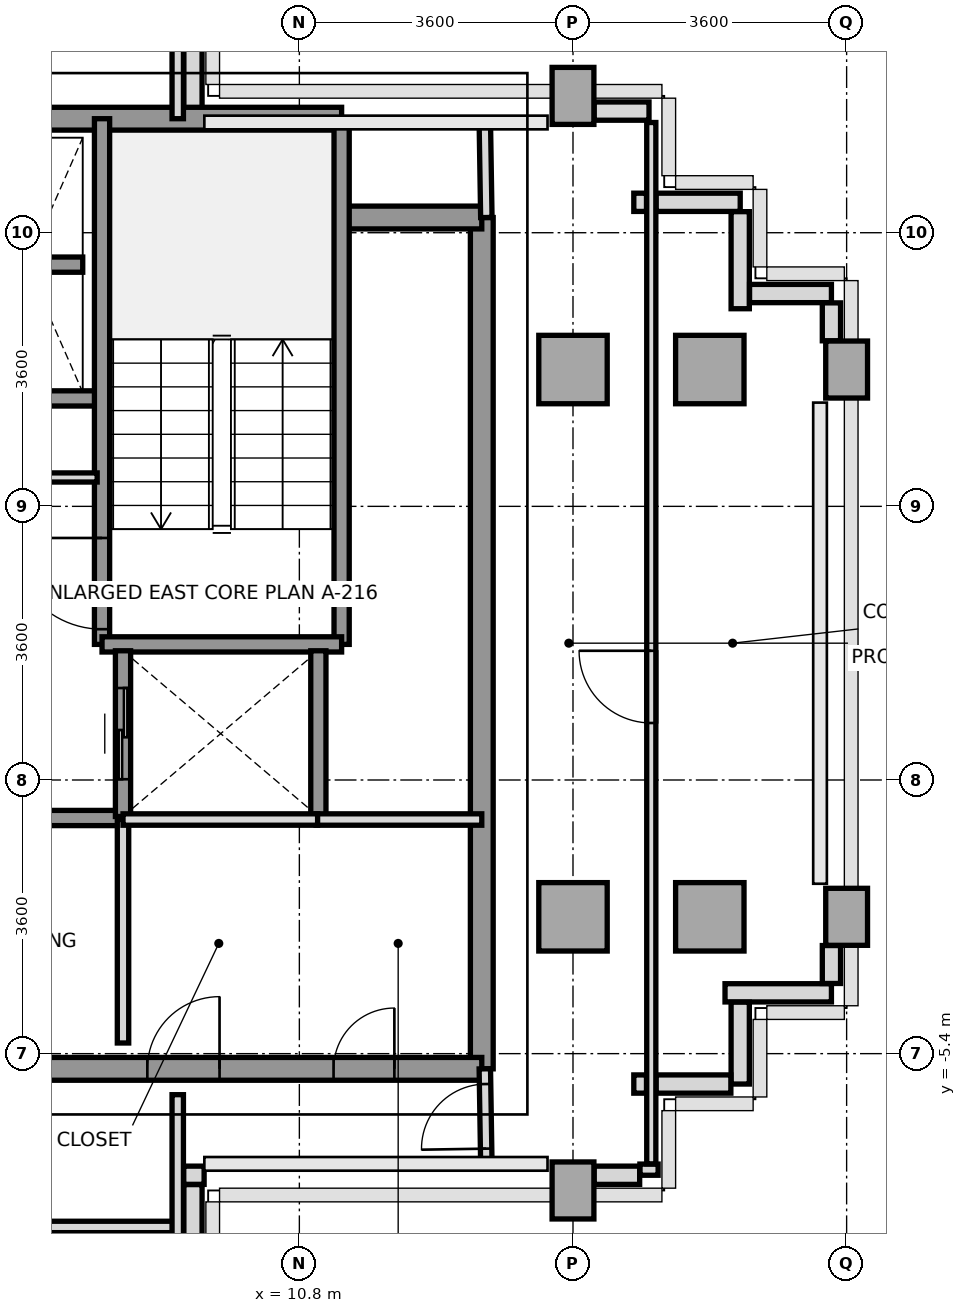
"""IFC4 building model, lengths in metres.
Left out: names, types, materials, properties, quantities, classifications, styles, units other than length and angle.
Written with IfcOpenShell. Run it as: python <this file> out.ifc"""

import sys

from ifc_helpers import new_model, si_unit, direction, frame, frame_2d, origin, origin_2d, place, context, subcontext, project, spatial, rectangle, extrude, source, transform, mapped, element, fill, save


model = new_model("IFC4")
c1 = context("Model", 3, precision=1e-05, world=origin(), true_north=direction((0.0, 1.0)))
c2 = subcontext(c1, "Body", "Model", "MODEL_VIEW")
j1 = project(units=[si_unit("LENGTHUNIT", "METRE"), si_unit("PLANEANGLEUNIT", "RADIAN")], contexts=[c1])
p1 = place(None, origin())
s1 = spatial("IfcSite", under=j1, at=p1, CompositionType="ELEMENT")
p2 = place(p1, origin())
s2 = spatial("IfcBuilding", under=s1, at=p2, CompositionType="ELEMENT")
p3 = place(p2, frame((0.0, 0.0, 236.4)))
s3 = spatial("IfcBuildingStorey", under=s2, at=p3, CompositionType="ELEMENT", Elevation=236.4)
m1 = source(origin(), c2, "Body", "SweptSolid", [
    extrude(rectangle(XDim=0.55, YDim=0.75, at=origin_2d()), origin(), (0.0, 0.0, 1.0), 3.01),
])
p4 = place(p3, frame((14.4, -7.2, 0.0), z_axis=(0.0, 0.0, 1.0), x_axis=(1.0, 0.0, 0.0)))
e1 = element("IfcColumn", 1, at=p4, inside=s3, PredefinedType="COLUMN", context=c2, shape_type="MappedRepresentation", body=[
    mapped(m1, transform((0.0, 0.0, 0.0), x_axis=(1.0, 0.0, 0.0), y_axis=(0.0, 1.0, 0.0), z_axis=(0.0, 0.0, 1.0), scale=1.0)),
])
m2 = source(origin(), c2, "Body", "SweptSolid", [
    extrude(rectangle(XDim=0.9, YDim=0.9, at=origin_2d()), origin(), (0.0, 0.0, 1.0), 3.01),
])
for number, where, z_axis, x_axis in (
    (2, (14.4, -3.6, 0.0), (0.0, 0.0, 1.0), (1.0, 0.0, 0.0)),
    (3, (14.4, 3.6, 0.0), (0.0, 0.0, 1.0), (1.0, 0.0, 0.0)),
):
    element("IfcColumn", number, at=place(p3, frame(where, z_axis=z_axis, x_axis=x_axis)), inside=s3, PredefinedType="COLUMN", context=c2, shape_type="MappedRepresentation", body=[
        mapped(m2, transform((0.0, 0.0, 0.0), x_axis=(1.0, 0.0, 0.0), y_axis=(0.0, 1.0, 0.0), z_axis=(0.0, 0.0, 1.0), scale=1.0)),
    ])
p5 = place(p3, frame((14.4, 7.2, 0.0), z_axis=(0.0, 0.0, 1.0), x_axis=(1.0, 0.0, 0.0)))
e4 = element("IfcColumn", 4, at=p5, inside=s3, PredefinedType="COLUMN", context=c2, shape_type="MappedRepresentation", body=[
    mapped(m1, transform((0.0, 0.0, 0.0), x_axis=(1.0, 0.0, 0.0), y_axis=(0.0, 1.0, 0.0), z_axis=(0.0, 0.0, 1.0), scale=1.0)),
])
for number, where, z_axis, x_axis in (
    (5, (16.2, -3.6, 0.0), (0.0, 0.0, 1.0), (1.0, 0.0, 0.0)),
    (6, (16.2, 3.6, 0.0), (0.0, 0.0, 1.0), (1.0, 0.0, 0.0)),
):
    element("IfcColumn", number, at=place(p3, frame(where, z_axis=z_axis, x_axis=x_axis)), inside=s3, PredefinedType="COLUMN", context=c2, shape_type="MappedRepresentation", body=[
        mapped(m2, transform((0.0, 0.0, 0.0), x_axis=(1.0, 0.0, 0.0), y_axis=(0.0, 1.0, 0.0), z_axis=(0.0, 0.0, 1.0), scale=1.0)),
    ])
for number, where, z_axis, x_axis in (
    (7, (18.0, -3.6, 0.0), (0.0, 0.0, 1.0), (1.0, 0.0, 0.0)),
    (8, (18.0, 3.6, 0.0), (0.0, 0.0, 1.0), (1.0, 0.0, 0.0)),
):
    element("IfcColumn", number, at=place(p3, frame(where, z_axis=z_axis, x_axis=x_axis)), inside=s3, PredefinedType="COLUMN", context=c2, shape_type="MappedRepresentation", body=[
        mapped(m1, transform((0.0, 0.0, 0.0), x_axis=(1.0, 0.0, 0.0), y_axis=(0.0, 1.0, 0.0), z_axis=(0.0, 0.0, 1.0), scale=1.0)),
    ])
p6 = place(p3, frame((17.8, -4.6, 0.0), z_axis=(0.0, 0.0, 1.0), x_axis=(-1.0, 0.0, 0.0)))
e9 = element("IfcWall", 9, at=p6, inside=s3, PredefinedType="PARAPET", context=c2, shape_type="SweptSolid", body=[
    extrude(rectangle(XDim=1.4, YDim=0.24, at=frame_2d((0.7, 0.0))), origin(), (0.0, 0.0, 1.0), 1.15),
])
p7 = place(p3, frame((16.6, -4.723, 0.0), z_axis=(0.0, 0.0, 1.0), x_axis=(0.0, -1.0, 0.0)))
e10 = element("IfcWall", 10, at=p7, inside=s3, PredefinedType="PARAPET", context=c2, shape_type="SweptSolid", body=[
    extrude(rectangle(XDim=1.077, YDim=0.24, at=frame_2d((0.539, 0.0))), origin(), (0.0, 0.0, 1.0), 1.15),
])
p8 = place(p3, frame((16.477, -5.8, 0.0), z_axis=(0.0, 0.0, 1.0), x_axis=(-1.0, 0.0, 0.0)))
e11 = element("IfcWall", 11, at=p8, inside=s3, PredefinedType="PARAPET", context=c2, shape_type="SweptSolid", body=[
    extrude(rectangle(XDim=0.984, YDim=0.24, at=frame_2d((0.492, 0.0))), origin(), (0.0, 0.0, 1.0), 1.15),
])
p9 = place(p3, frame((15.367, -5.8, 0.0), z_axis=(0.0, 0.0, 1.0), x_axis=(-1.0, 0.0, 0.0)))
e12 = element("IfcWall", 12, at=p9, inside=s3, PredefinedType="PARAPET", context=c2, shape_type="SweptSolid", body=[
    extrude(rectangle(XDim=0.167, YDim=0.24, at=frame_2d((0.083, 0.0))), origin(), (0.0, 0.0, 1.0), 1.15),
])
p10 = place(p3, frame((15.4, -6.853, 0.0), z_axis=(0.0, 0.0, 1.0), x_axis=(0.0, -1.0, 0.0)))
e13 = element("IfcWall", 13, at=p10, inside=s3, PredefinedType="PARAPET", context=c2, shape_type="SweptSolid", body=[
    extrude(rectangle(XDim=0.147, YDim=0.24, at=frame_2d((0.073, 0.0))), origin(), (0.0, 0.0, 1.0), 1.15),
])
p11 = place(p3, frame((15.277, -7.0, 0.0), z_axis=(0.0, 0.0, 1.0), x_axis=(-1.0, 0.0, 0.0)))
e14 = element("IfcWall", 14, at=p11, inside=s3, PredefinedType="PARAPET", context=c2, shape_type="SweptSolid", body=[
    extrude(rectangle(XDim=0.599, YDim=0.24, at=frame_2d((0.3, 0.0))), origin(), (0.0, 0.0, 1.0), 1.15),
])
p12 = place(p3, frame((9.547, -7.0, 0.0), z_axis=(0.0, 0.0, 1.0), x_axis=(-1.0, 0.0, 0.0)))
e15 = element("IfcWall", 15, at=p12, inside=s3, PredefinedType="PARAPET", context=c2, shape_type="SweptSolid", body=[
    extrude(rectangle(XDim=0.269, YDim=0.24, at=frame_2d((0.135, 0.0))), origin(), (0.0, 0.0, 1.0), 1.15),
])
p13 = place(p3, frame((9.4, -7.123, 0.0), z_axis=(0.0, 0.0, 1.0), x_axis=(0.0, -1.0, 0.0)))
e16 = element("IfcWall", 16, at=p13, inside=s3, PredefinedType="PARAPET", context=c2, shape_type="SweptSolid", body=[
    extrude(rectangle(XDim=1.499, YDim=0.24, at=frame_2d((0.75, 0.0))), origin(), (0.0, 0.0, 1.0), 1.15),
])
p14 = place(p3, frame((9.4, 8.622, 0.0), z_axis=(0.0, 0.0, 1.0), x_axis=(0.0, -1.0, 0.0)))
e17 = element("IfcWall", 17, at=p14, inside=s3, PredefinedType="PARAPET", context=c2, shape_type="SweptSolid", body=[
    extrude(rectangle(XDim=1.669, YDim=0.24, at=frame_2d((0.834, 0.0))), origin(), (0.0, 0.0, 1.0), 1.15),
])
p15 = place(p3, frame((14.678, 7.0, 0.0), z_axis=(0.0, 0.0, 1.0), x_axis=(1.0, 0.0, 0.0)))
e18 = element("IfcWall", 18, at=p15, inside=s3, PredefinedType="PARAPET", context=c2, shape_type="SweptSolid", body=[
    extrude(rectangle(XDim=0.722, YDim=0.24, at=frame_2d((0.361, 0.0))), origin(), (0.0, 0.0, 1.0), 1.15),
])
p16 = place(p3, frame((15.2, 5.8, 0.0), z_axis=(0.0, 0.0, 1.0), x_axis=(1.0, 0.0, 0.0)))
e19 = element("IfcWall", 19, at=p16, inside=s3, PredefinedType="PARAPET", context=c2, shape_type="SweptSolid", body=[
    extrude(rectangle(XDim=0.167, YDim=0.24, at=frame_2d((0.083, 0.0))), origin(), (0.0, 0.0, 1.0), 1.15),
])
p17 = place(p3, frame((15.493, 5.8, 0.0), z_axis=(0.0, 0.0, 1.0), x_axis=(1.0, 0.0, 0.0)))
e20 = element("IfcWall", 20, at=p17, inside=s3, PredefinedType="PARAPET", context=c2, shape_type="SweptSolid", body=[
    extrude(rectangle(XDim=1.107, YDim=0.24, at=frame_2d((0.554, 0.0))), origin(), (0.0, 0.0, 1.0), 1.15),
])
p18 = place(p3, frame((16.6, 5.677, 0.0), z_axis=(0.0, 0.0, 1.0), x_axis=(0.0, -1.0, 0.0)))
e21 = element("IfcWall", 21, at=p18, inside=s3, PredefinedType="PARAPET", context=c2, shape_type="SweptSolid", body=[
    extrude(rectangle(XDim=1.277, YDim=0.24, at=frame_2d((0.639, 0.0))), origin(), (0.0, 0.0, 1.0), 1.15),
])
p19 = place(p3, frame((16.723, 4.6, 0.0), z_axis=(0.0, 0.0, 1.0), x_axis=(1.0, 0.0, 0.0)))
e22 = element("IfcWall", 22, at=p19, inside=s3, PredefinedType="PARAPET", context=c2, shape_type="SweptSolid", body=[
    extrude(rectangle(XDim=1.077, YDim=0.24, at=frame_2d((0.539, 0.0))), origin(), (0.0, 0.0, 1.0), 1.15),
])
for number, where, z_axis, x_axis in (
    (23, (17.8, 4.477, 0.0), (0.0, 0.0, 1.0), (0.0, -1.0, 0.0)),
    (24, (17.8, -3.978, 0.0), (0.0, 0.0, 1.0), (0.0, -1.0, 0.0)),
):
    element("IfcWall", number, at=place(p3, frame(where, z_axis=z_axis, x_axis=x_axis)), inside=s3, PredefinedType="PARAPET", context=c2, shape_type="SweptSolid", body=[
        extrude(rectangle(XDim=0.499, YDim=0.24, at=frame_2d((0.25, 0.0))), origin(), (0.0, 0.0, 1.0), 1.15),
    ])
p20 = place(p3, frame((13.2, -5.6, 0.0), z_axis=(0.0, 0.0, 1.0), x_axis=(0.0, 1.0, 0.0)))
e25 = element("IfcWall", 25, at=p20, inside=s3, PredefinedType="SHEAR", context=c2, shape_type="SweptSolid", body=[
    extrude(rectangle(XDim=11.2, YDim=0.3, at=frame_2d((5.6, 0.0))), origin(), (0.0, 0.0, 1.0), 3.01),
])
p21 = place(p3, frame((5.4, 6.9, 0.0), z_axis=(0.0, 0.0, 1.0), x_axis=(1.0, 0.0, 0.0)))
e26 = element("IfcWall", 26, at=p21, inside=s3, PredefinedType="SHEAR", context=c2, shape_type="SweptSolid", body=[
    extrude(rectangle(XDim=5.956, YDim=0.3, at=frame_2d((2.978, 0.0))), origin(), (0.0, 0.0, 1.0), 3.01),
])
p22 = place(p3, frame((11.356, 5.6, 0.0), z_axis=(0.0, 0.0, 1.0), x_axis=(1.0, 0.0, 0.0)))
e27 = element("IfcWall", 27, at=p22, inside=s3, PredefinedType="SHEAR", context=c2, shape_type="SweptSolid", body=[
    extrude(rectangle(XDim=1.844, YDim=0.3, at=frame_2d((0.922, 0.0))), origin(), (0.0, 0.0, 1.0), 3.01),
])
p23 = place(p3, frame((5.4, -5.6, 0.0), z_axis=(0.0, 0.0, 1.0), x_axis=(1.0, 0.0, 0.0)))
e28 = element("IfcWall", 28, at=p23, inside=s3, PredefinedType="SHEAR", context=c2, shape_type="SweptSolid", body=[
    extrude(rectangle(XDim=7.8, YDim=0.3, at=frame_2d((3.9, 0.0))), origin(), (0.0, 0.0, 1.0), 3.01),
])
p24 = place(p23, frame((5.85, 0.0, 0.0)))
e29 = element("IfcOpeningElement", 29, at=p24, cuts=e28, PredefinedType="OPENING", context=c2, shape_type="SweptSolid", body=[
    extrude(rectangle(XDim=0.8, YDim=2.1, at=frame_2d((0.4, 1.05))), frame((0.0, 0.16, 0.0), z_axis=(0.0, -1.0, 0.0), x_axis=(1.0, 0.0, 0.0)), (0.0, 0.0, 1.0), 0.32),
])
p25 = place(p23, frame((3.4, 0.0, 0.0)))
e30 = element("IfcOpeningElement", 30, at=p25, cuts=e28, PredefinedType="OPENING", context=c2, shape_type="SweptSolid", body=[
    extrude(rectangle(XDim=0.95, YDim=2.15, at=frame_2d((0.475, 1.075))), frame((0.0, 0.16, 0.0), z_axis=(0.0, -1.0, 0.0), x_axis=(1.0, 0.0, 0.0)), (0.0, 0.0, 1.0), 0.32),
])
p26 = place(p3, frame((5.4, 3.22, 0.0), z_axis=(0.0, 0.0, 1.0), x_axis=(1.0, 0.0, 0.0)))
e31 = element("IfcWall", 31, at=p26, inside=s3, PredefinedType="SOLIDWALL", context=c2, shape_type="SweptSolid", body=[
    extrude(rectangle(XDim=2.78, YDim=0.2, at=frame_2d((1.39, 0.0))), origin(), (0.0, 0.0, 1.0), 3.01),
])
p27 = place(p3, frame((5.4, -2.3, 0.0), z_axis=(0.0, 0.0, 1.0), x_axis=(1.0, 0.0, 0.0)))
e32 = element("IfcWall", 32, at=p27, inside=s3, PredefinedType="SOLIDWALL", context=c2, shape_type="SweptSolid", body=[
    extrude(rectangle(XDim=3.08, YDim=0.2, at=frame_2d((1.54, 0.0))), origin(), (0.0, 0.0, 1.0), 3.01),
])
p28 = place(p3, frame((8.204, -0.016, 0.0), z_axis=(0.0, 0.0, 1.0), x_axis=(0.0, 1.0, 0.0)))
e33 = element("IfcWall", 33, at=p28, inside=s3, PredefinedType="SOLIDWALL", context=c2, shape_type="SweptSolid", body=[
    extrude(rectangle(XDim=6.916, YDim=0.2, at=frame_2d((3.458, 0.0))), origin(), (0.0, 0.0, 1.0), 3.01),
])
p29 = place(p28, frame((0.2, 0.0, 0.0)))
e34 = element("IfcOpeningElement", 34, at=p29, cuts=e33, PredefinedType="OPENING", context=c2, shape_type="SweptSolid", body=[
    extrude(rectangle(XDim=1.2, YDim=2.2, at=frame_2d((0.6, 1.1))), frame((0.0, 0.11, 0.0), z_axis=(0.0, -1.0, 0.0), x_axis=(1.0, 0.0, 0.0)), (0.0, 0.0, 1.0), 0.22),
])
p30 = place(p3, frame((11.356, -0.016, 0.0), z_axis=(0.0, 0.0, 1.0), x_axis=(0.0, 1.0, 0.0)))
e35 = element("IfcWall", 35, at=p30, inside=s3, PredefinedType="SOLIDWALL", context=c2, shape_type="SweptSolid", body=[
    extrude(rectangle(XDim=6.916, YDim=0.2, at=frame_2d((3.458, 0.0))), origin(), (0.0, 0.0, 1.0), 3.01),
])
p31 = place(p3, frame((8.204, -0.016, 0.0), z_axis=(0.0, 0.0, 1.0), x_axis=(1.0, 0.0, 0.0)))
e36 = element("IfcWall", 36, at=p31, inside=s3, PredefinedType="SOLIDWALL", context=c2, shape_type="SweptSolid", body=[
    extrude(rectangle(XDim=3.152, YDim=0.2, at=frame_2d((1.576, 0.0))), origin(), (0.0, 0.0, 1.0), 3.01),
])
p32 = place(p3, frame((8.48, -2.28, 0.0), z_axis=(0.0, 0.0, 1.0), x_axis=(0.0, 1.0, 0.0)))
e37 = element("IfcWall", 37, at=p32, inside=s3, PredefinedType="SOLIDWALL", context=c2, shape_type="SweptSolid", body=[
    extrude(rectangle(XDim=2.18, YDim=0.2, at=frame_2d((1.09, 0.0))), origin(), (0.0, 0.0, 1.0), 3.01),
])
p33 = place(p32, frame((0.49, 0.0, 0.0)))
e38 = element("IfcOpeningElement", 38, at=p33, cuts=e37, PredefinedType="OPENING", context=c2, shape_type="SweptSolid", body=[
    extrude(rectangle(XDim=1.2, YDim=2.2, at=frame_2d((0.6, 1.1))), frame((0.0, 0.11, 0.0), z_axis=(0.0, -1.0, 0.0), x_axis=(1.0, 0.0, 0.0)), (0.0, 0.0, 1.0), 0.22),
])
p34 = place(p3, frame((11.05, -2.28, 0.0), z_axis=(0.0, 0.0, 1.0), x_axis=(0.0, 1.0, 0.0)))
e39 = element("IfcWall", 39, at=p34, inside=s3, PredefinedType="SOLIDWALL", context=c2, shape_type="SweptSolid", body=[
    extrude(rectangle(XDim=2.18, YDim=0.2, at=frame_2d((1.09, 0.0))), origin(), (0.0, 0.0, 1.0), 3.01),
])
p35 = place(p3, frame((6.48, 4.98, 0.0), z_axis=(0.0, 0.0, 1.0), x_axis=(1.0, 0.0, 0.0)))
e40 = element("IfcWall", 40, at=p35, inside=s3, PredefinedType="SOLIDWALL", context=c2, shape_type="SweptSolid", body=[
    extrude(rectangle(XDim=1.47, YDim=0.2, at=frame_2d((0.735, 0.0))), origin(), (0.0, 0.0, 1.0), 3.01),
])
p36 = place(p3, frame((5.75, 2.18, 0.0), z_axis=(0.0, 0.0, 1.0), x_axis=(1.0, 0.0, 0.0)))
e41 = element("IfcWall", 41, at=p36, inside=s3, PredefinedType="PARTITIONING", context=c2, shape_type="SweptSolid", body=[
    extrude(rectangle(XDim=2.39, YDim=0.12, at=frame_2d((1.195, 0.0))), origin(), (0.0, 0.0, 1.0), 3.01),
])
p37 = place(p3, frame((11.02, -2.32, 0.0), z_axis=(0.0, 0.0, 1.0), x_axis=(1.0, 0.0, 0.0)))
e42 = element("IfcWall", 42, at=p37, inside=s3, PredefinedType="PARTITIONING", context=c2, shape_type="SweptSolid", body=[
    extrude(rectangle(XDim=2.18, YDim=0.15, at=frame_2d((1.09, 0.0))), origin(), (0.0, 0.0, 1.0), 3.01),
])
p38 = place(p3, frame((8.48, -5.26, 0.0), z_axis=(0.0, 0.0, 1.0), x_axis=(0.0, 1.0, 0.0)))
e43 = element("IfcWall", 43, at=p38, inside=s3, PredefinedType="PARTITIONING", context=c2, shape_type="SweptSolid", body=[
    extrude(rectangle(XDim=2.94, YDim=0.15, at=frame_2d((1.47, 0.0))), origin(), (0.0, 0.0, 1.0), 3.01),
])
p39 = place(p3, frame((8.48, -2.32, 0.0), z_axis=(0.0, 0.0, 1.0), x_axis=(1.0, 0.0, 0.0)))
e44 = element("IfcWall", 44, at=p39, inside=s3, PredefinedType="PARTITIONING", context=c2, shape_type="SweptSolid", body=[
    extrude(rectangle(XDim=2.56, YDim=0.15, at=frame_2d((1.28, 0.0))), origin(), (0.0, 0.0, 1.0), 3.01),
])
p40 = place(p3, frame((9.2, 6.9, 0.0), z_axis=(0.0, 0.0, 1.0), x_axis=(0.0, 1.0, 0.0)))
e45 = element("IfcWall", 45, at=p40, inside=s3, PredefinedType="PARTITIONING", context=c2, shape_type="SweptSolid", body=[
    extrude(rectangle(XDim=3.38, YDim=0.15, at=frame_2d((1.69, 0.0))), origin(), (0.0, 0.0, 1.0), 2.61),
])
p41 = place(p3, frame((-9.2, -7.68, 0.0), z_axis=(0.0, 0.0, 1.0), x_axis=(1.0, 0.0, 0.0)))
e46 = element("IfcWall", 46, at=p41, inside=s3, PredefinedType="PARTITIONING", context=c2, shape_type="SweptSolid", body=[
    extrude(rectangle(XDim=18.4, YDim=0.15, at=frame_2d((9.2, 0.0))), origin(), (0.0, 0.0, 1.0), 2.57),
])
p42 = place(p41, frame((2.0, 0.0, 0.0)))
e47 = element("IfcOpeningElement", 47, at=p42, cuts=e46, PredefinedType="OPENING", context=c2, shape_type="SweptSolid", body=[
    extrude(rectangle(XDim=0.95, YDim=2.15, at=frame_2d((0.475, 1.075))), frame((0.0, 0.085, 0.0), z_axis=(0.0, -1.0, 0.0), x_axis=(1.0, 0.0, 0.0)), (0.0, 0.0, 1.0), 0.17),
])
p43 = place(p41, frame((10.6, 0.0, 0.0)))
e48 = element("IfcOpeningElement", 48, at=p43, cuts=e46, PredefinedType="OPENING", context=c2, shape_type="SweptSolid", body=[
    extrude(rectangle(XDim=1.1, YDim=2.2, at=frame_2d((0.55, 1.1))), frame((0.0, 0.085, 0.0), z_axis=(0.0, -1.0, 0.0), x_axis=(1.0, 0.0, 0.0)), (0.0, 0.0, 1.0), 0.17),
])
p44 = place(p3, frame((9.2, -10.28, 0.0), z_axis=(0.0, 0.0, 1.0), x_axis=(0.0, 1.0, 0.0)))
e49 = element("IfcWall", 49, at=p44, inside=s3, PredefinedType="PARTITIONING", context=c2, shape_type="SweptSolid", body=[
    extrude(rectangle(XDim=4.34, YDim=0.15, at=frame_2d((2.17, 0.0))), origin(), (0.0, 0.0, 1.0), 2.61),
])
p45 = place(p3, frame((13.26, 5.6, 0.0), z_axis=(0.0, 0.0, 1.0), x_axis=(-0.016013571389, 0.999871774545, 0.0)))
e50 = element("IfcWall", 50, at=p45, inside=s3, PredefinedType="PARTITIONING", context=c2, shape_type="SweptSolid", body=[
    extrude(rectangle(XDim=1.25, YDim=0.15, at=frame_2d((0.625, 0.0))), origin(), (0.0, 0.0, 1.0), 3.01),
])
p46 = place(p3, frame((13.26, -6.85, 0.0), z_axis=(0.0, 0.0, 1.0), x_axis=(-0.016013571389, 0.999871774545, 0.0)))
e51 = element("IfcWall", 51, at=p46, inside=s3, PredefinedType="PARTITIONING", context=c2, shape_type="SweptSolid", body=[
    extrude(rectangle(XDim=1.25, YDim=0.15, at=frame_2d((0.625, 0.0))), origin(), (0.0, 0.0, 1.0), 3.01),
])
p47 = place(p46, frame((0.2, 0.0, 0.0)))
e52 = element("IfcOpeningElement", 52, at=p47, cuts=e51, PredefinedType="OPENING", context=c2, shape_type="SweptSolid", body=[
    extrude(rectangle(XDim=0.85, YDim=2.1, at=frame_2d((0.425, 1.05))), frame((0.0, 0.085, 0.0), z_axis=(0.0, -1.0, 0.0), x_axis=(1.0, 0.0, 0.0)), (0.0, 0.0, 1.0), 0.17),
])
p48 = place(p3, frame((15.43, -6.85, 0.0), z_axis=(0.0, 0.0, 1.0), x_axis=(0.0, 1.0, 0.0)))
e53 = element("IfcWall", 53, at=p48, inside=s3, PredefinedType="PARTITIONING", context=c2, shape_type="SweptSolid", body=[
    extrude(rectangle(XDim=13.7, YDim=0.12, at=frame_2d((6.85, 0.0))), origin(), (0.0, 0.0, 1.0), 3.01),
])
p49 = place(p48, frame((5.8, 0.0, 0.0)))
e54 = element("IfcOpeningElement", 54, at=p49, cuts=e53, PredefinedType="OPENING", context=c2, shape_type="SweptSolid", body=[
    extrude(rectangle(XDim=0.95, YDim=2.15, at=frame_2d((0.475, 1.075))), frame((0.0, 0.07, 0.0), z_axis=(0.0, -1.0, 0.0), x_axis=(1.0, 0.0, 0.0)), (0.0, 0.0, 1.0), 0.14),
])
m3 = source(origin(), c2, "Body", "SweptSolid", [
    extrude(rectangle(XDim=1.2, YDim=2.2, at=frame_2d((0.6, 1.1))), frame((0.0, 0.025, 0.0), z_axis=(0.0, -1.0, 0.0), x_axis=(1.0, 0.0, 0.0)), (0.0, 0.0, 1.0), 0.05),
])
p50 = place(p29, origin())
e55 = element("IfcDoor", 55, at=p50, inside=s3, OperationType="SINGLE_SWING_RIGHT", PredefinedType="DOOR", context=c2, shape_type="MappedRepresentation", body=[
    mapped(m3, transform((0.0, 0.0, 0.0), x_axis=(1.0, 0.0, 0.0), y_axis=(0.0, 1.0, 0.0), z_axis=(0.0, 0.0, 1.0), scale=1.0)),
])
fill(e34, e55)
m4 = source(origin(), c2, "Body", "SweptSolid", [
    extrude(rectangle(XDim=0.8, YDim=2.1, at=frame_2d((0.4, 1.05))), frame((0.0, 0.025, 0.0), z_axis=(0.0, -1.0, 0.0), x_axis=(1.0, 0.0, 0.0)), (0.0, 0.0, 1.0), 0.05),
])
p51 = place(p24, origin())
e56 = element("IfcDoor", 56, at=p51, inside=s3, OperationType="SINGLE_SWING_RIGHT", PredefinedType="DOOR", context=c2, shape_type="MappedRepresentation", body=[
    mapped(m4, transform((0.0, 0.0, 0.0), x_axis=(1.0, 0.0, 0.0), y_axis=(0.0, 1.0, 0.0), z_axis=(0.0, 0.0, 1.0), scale=1.0)),
])
fill(e29, e56)
m5 = source(origin(), c2, "Body", "SweptSolid", [
    extrude(rectangle(XDim=0.95, YDim=2.15, at=frame_2d((0.475, 1.075))), frame((0.0, 0.025, 0.0), z_axis=(0.0, -1.0, 0.0), x_axis=(1.0, 0.0, 0.0)), (0.0, 0.0, 1.0), 0.05),
])
p52 = place(p25, origin())
e57 = element("IfcDoor", 57, at=p52, inside=s3, OperationType="SINGLE_SWING_RIGHT", PredefinedType="DOOR", context=c2, shape_type="MappedRepresentation", body=[
    mapped(m5, transform((0.0, 0.0, 0.0), x_axis=(1.0, 0.0, 0.0), y_axis=(0.0, 1.0, 0.0), z_axis=(0.0, 0.0, 1.0), scale=1.0)),
])
fill(e30, e57)
p53 = place(p33, origin())
e58 = element("IfcDoor", 58, at=p53, inside=s3, OperationType="SLIDING_TO_RIGHT", PredefinedType="DOOR", context=c2, shape_type="MappedRepresentation", body=[
    mapped(m3, transform((0.0, 0.0, 0.0), x_axis=(1.0, 0.0, 0.0), y_axis=(0.0, 1.0, 0.0), z_axis=(0.0, 0.0, 1.0), scale=1.0)),
])
fill(e38, e58)
m6 = source(origin(), c2, "Body", "SweptSolid", [
    extrude(rectangle(XDim=0.85, YDim=2.1, at=frame_2d((0.425, 1.05))), frame((0.0, 0.025, 0.0), z_axis=(0.0, -1.0, 0.0), x_axis=(1.0, 0.0, 0.0)), (0.0, 0.0, 1.0), 0.05),
])
p54 = place(p47, origin())
e59 = element("IfcDoor", 59, at=p54, inside=s3, OperationType="SINGLE_SWING_LEFT", PredefinedType="DOOR", context=c2, shape_type="MappedRepresentation", body=[
    mapped(m6, transform((0.0, 0.0, 0.0), x_axis=(1.0, 0.0, 0.0), y_axis=(0.0, 1.0, 0.0), z_axis=(0.0, 0.0, 1.0), scale=1.0)),
])
fill(e52, e59)
p55 = place(p49, origin())
e60 = element("IfcDoor", 60, at=p55, inside=s3, OperationType="SINGLE_SWING_RIGHT", PredefinedType="DOOR", context=c2, shape_type="MappedRepresentation", body=[
    mapped(m5, transform((0.0, 0.0, 0.0), x_axis=(1.0, 0.0, 0.0), y_axis=(0.0, 1.0, 0.0), z_axis=(0.0, 0.0, 1.0), scale=1.0)),
])
fill(e54, e60)
save(model, sys.argv[1])
